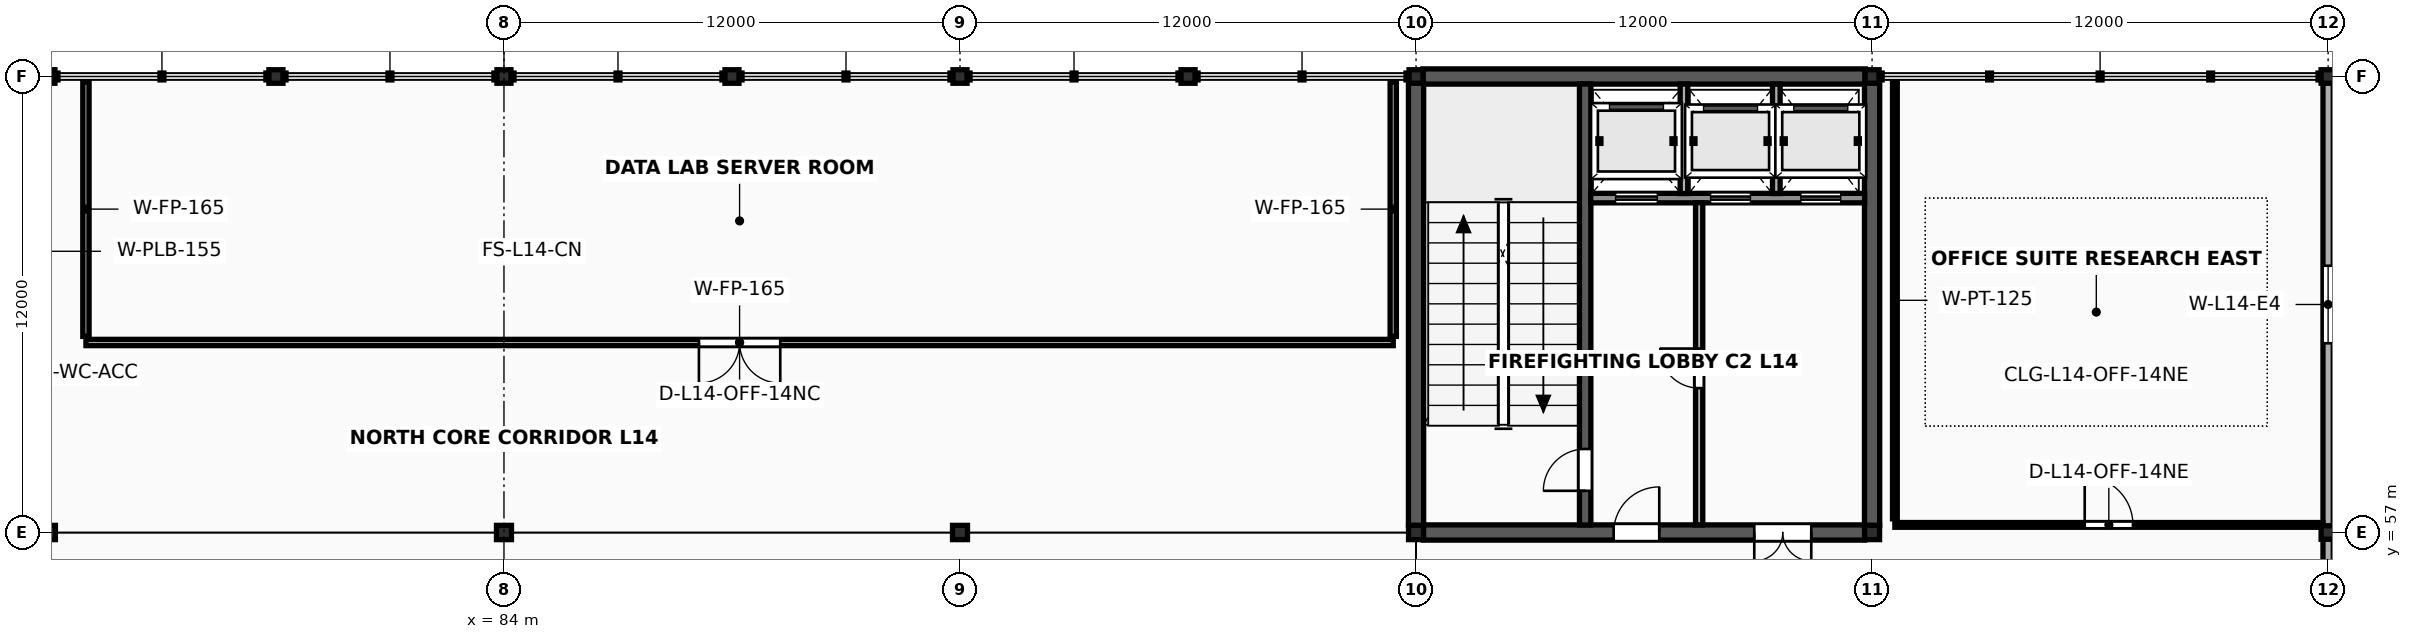
"""IFC4 building model, lengths in metres.
Left out: names, types, materials, properties, quantities, classifications, styles, units other than length and angle.
Written with IfcOpenShell. Run it as: python <this file> out.ifc"""

import sys

from ifc_helpers import new_model, si_unit, direction, frame, frame_2d, origin, origin_2d, place, context, subcontext, project, spatial, rectangle, i_section, extrude, element, fill, save


model = new_model("IFC4")
c1 = context("Model", 3, precision=1e-05, world=origin(), true_north=direction((0.0, 1.0)))
c2 = subcontext(c1, "Body", "Model", "MODEL_VIEW")
j1 = project(units=[si_unit("LENGTHUNIT", "METRE"), si_unit("PLANEANGLEUNIT", "RADIAN")], contexts=[c1])
p1 = place(None, origin())
s1 = spatial("IfcSite", under=j1, at=p1, CompositionType="ELEMENT")
p2 = place(p1, origin())
s2 = spatial("IfcBuilding", under=s1, at=p2, CompositionType="ELEMENT")
p3 = place(p2, frame((0.0, 0.0, 57.6)))
s3 = spatial("IfcBuildingStorey", under=s2, at=p3, CompositionType="ELEMENT", Elevation=57.6)
p4 = place(p3, frame((72.0, 57.0, 0.0), z_axis=(0.0, 0.0, 1.0), x_axis=(1.0, 0.0, 0.0)))
e1 = element("IfcColumn", 1, at=p4, inside=s3, PredefinedType="COLUMN", context=c2, shape_type="SweptSolid", body=[
    extrude(i_section(OverallWidth=0.394, OverallDepth=0.375, WebThickness=0.017, FlangeThickness=0.028, FilletRadius=0.018, at=origin_2d()), origin(), (0.0, 0.0, 1.0), 4.0),
])
p5 = place(p3, frame((72.0, 69.0, 0.0), z_axis=(0.0, 0.0, 1.0), x_axis=(1.0, 0.0, 0.0)))
e2 = element("IfcColumn", 2, at=p5, inside=s3, PredefinedType="COLUMN", context=c2, shape_type="SweptSolid", body=[
    extrude(i_section(OverallWidth=0.369, OverallDepth=0.356, WebThickness=0.011, FlangeThickness=0.018, FilletRadius=0.018, at=origin_2d()), origin(), (0.0, 0.0, 1.0), 4.0),
])
p6 = place(p3, frame((84.0, 57.0, 0.0), z_axis=(0.0, 0.0, 1.0), x_axis=(1.0, 0.0, 0.0)))
e3 = element("IfcColumn", 3, at=p6, inside=s3, PredefinedType="COLUMN", context=c2, shape_type="SweptSolid", body=[
    extrude(i_section(OverallWidth=0.394, OverallDepth=0.375, WebThickness=0.017, FlangeThickness=0.028, FilletRadius=0.018, at=origin_2d()), origin(), (0.0, 0.0, 1.0), 4.0),
])
p7 = place(p3, frame((84.0, 69.0, 0.0), z_axis=(0.0, 0.0, 1.0), x_axis=(1.0, 0.0, 0.0)))
e4 = element("IfcColumn", 4, at=p7, inside=s3, PredefinedType="COLUMN", context=c2, shape_type="SweptSolid", body=[
    extrude(i_section(OverallWidth=0.369, OverallDepth=0.356, WebThickness=0.011, FlangeThickness=0.018, FilletRadius=0.018, at=origin_2d()), origin(), (0.0, 0.0, 1.0), 4.0),
])
p8 = place(p3, frame((96.0, 57.0, 0.0), z_axis=(0.0, 0.0, 1.0), x_axis=(1.0, 0.0, 0.0)))
e5 = element("IfcColumn", 5, at=p8, inside=s3, PredefinedType="COLUMN", context=c2, shape_type="SweptSolid", body=[
    extrude(i_section(OverallWidth=0.394, OverallDepth=0.375, WebThickness=0.017, FlangeThickness=0.028, FilletRadius=0.018, at=origin_2d()), origin(), (0.0, 0.0, 1.0), 4.0),
])
p9 = place(p3, frame((96.0, 69.0, 0.0), z_axis=(0.0, 0.0, 1.0), x_axis=(1.0, 0.0, 0.0)))
e6 = element("IfcColumn", 6, at=p9, inside=s3, PredefinedType="COLUMN", context=c2, shape_type="SweptSolid", body=[
    extrude(i_section(OverallWidth=0.369, OverallDepth=0.356, WebThickness=0.011, FlangeThickness=0.018, FilletRadius=0.018, at=origin_2d()), origin(), (0.0, 0.0, 1.0), 4.0),
])
p10 = place(p3, frame((108.0, 57.0, 0.0), z_axis=(0.0, 0.0, 1.0), x_axis=(1.0, 0.0, 0.0)))
e7 = element("IfcColumn", 7, at=p10, inside=s3, PredefinedType="COLUMN", context=c2, shape_type="SweptSolid", body=[
    extrude(i_section(OverallWidth=0.394, OverallDepth=0.375, WebThickness=0.017, FlangeThickness=0.028, FilletRadius=0.018, at=origin_2d()), origin(), (0.0, 0.0, 1.0), 4.0),
])
p11 = place(p3, frame((108.0, 69.0, 0.0), z_axis=(0.0, 0.0, 1.0), x_axis=(1.0, 0.0, 0.0)))
e8 = element("IfcColumn", 8, at=p11, inside=s3, PredefinedType="COLUMN", context=c2, shape_type="SweptSolid", body=[
    extrude(i_section(OverallWidth=0.369, OverallDepth=0.356, WebThickness=0.011, FlangeThickness=0.018, FilletRadius=0.018, at=origin_2d()), origin(), (0.0, 0.0, 1.0), 4.0),
])
p12 = place(p3, frame((120.0, 57.0, 0.0), z_axis=(0.0, 0.0, 1.0), x_axis=(1.0, 0.0, 0.0)))
e9 = element("IfcColumn", 9, at=p12, inside=s3, PredefinedType="COLUMN", context=c2, shape_type="SweptSolid", body=[
    extrude(i_section(OverallWidth=0.394, OverallDepth=0.375, WebThickness=0.017, FlangeThickness=0.028, FilletRadius=0.018, at=origin_2d()), origin(), (0.0, 0.0, 1.0), 4.0),
])
for number, where, z_axis, x_axis in (
    (10, (120.0, 69.0, 0.0), (0.0, 0.0, 1.0), (1.0, 0.0, 0.0)),
    (11, (132.0, 57.0, 0.0), (0.0, 0.0, 1.0), (1.0, 0.0, 0.0)),
    (12, (132.0, 69.0, 0.0), (0.0, 0.0, 1.0), (1.0, 0.0, 0.0)),
    (13, (78.0, 69.0, 0.0), (0.0, 0.0, 1.0), (1.0, 0.0, 0.0)),
    (14, (90.0, 69.0, 0.0), (0.0, 0.0, 1.0), (1.0, 0.0, 0.0)),
    (15, (102.0, 69.0, 0.0), (0.0, 0.0, 1.0), (1.0, 0.0, 0.0)),
):
    element("IfcColumn", number, at=place(p3, frame(where, z_axis=z_axis, x_axis=x_axis)), inside=s3, PredefinedType="COLUMN", context=c2, shape_type="SweptSolid", body=[
        extrude(i_section(OverallWidth=0.369, OverallDepth=0.356, WebThickness=0.011, FlangeThickness=0.018, FilletRadius=0.018, at=origin_2d()), origin(), (0.0, 0.0, 1.0), 4.0),
    ])
p13 = place(p3, frame((108.194, 57.0, 0.0), z_axis=(0.0, 0.0, 1.0), x_axis=(1.0, 0.0, 0.0)))
e16 = element("IfcWall", 16, at=p13, inside=s3, PredefinedType="SHEAR", context=c2, shape_type="SweptSolid", body=[
    extrude(rectangle(XDim=11.612, YDim=0.4, at=frame_2d((5.806, 0.0))), origin(), (0.0, 0.0, 1.0), 3.853),
])
p14 = place(p13, frame((5.006, 0.0, 0.0)))
e17 = element("IfcOpeningElement", 17, at=p14, cuts=e16, PredefinedType="OPENING", context=c2, shape_type="SweptSolid", body=[
    extrude(rectangle(XDim=1.2, YDim=2.2, at=frame_2d((0.6, 1.1))), frame((0.0, 0.215, 0.0), z_axis=(0.0, -1.0, 0.0), x_axis=(1.0, 0.0, 0.0)), (0.0, 0.0, 1.0), 0.43),
])
p15 = place(p13, frame((8.706, 0.0, 0.0)))
e18 = element("IfcOpeningElement", 18, at=p15, cuts=e16, PredefinedType="OPENING", context=c2, shape_type="SweptSolid", body=[
    extrude(rectangle(XDim=1.5, YDim=2.25, at=frame_2d((0.75, 1.125))), frame((0.0, 0.215, 0.0), z_axis=(0.0, -1.0, 0.0), x_axis=(1.0, 0.0, 0.0)), (0.0, 0.0, 1.0), 0.43),
])
p16 = place(p3, frame((108.181, 69.0, 0.0), z_axis=(0.0, 0.0, 1.0), x_axis=(1.0, 0.0, 0.0)))
e19 = element("IfcWall", 19, at=p16, inside=s3, PredefinedType="SHEAR", context=c2, shape_type="SweptSolid", body=[
    extrude(rectangle(XDim=11.637, YDim=0.4, at=frame_2d((5.819, 0.0))), origin(), (0.0, 0.0, 1.0), 3.853),
])
for number, where, z_axis, x_axis in (
    (20, (108.0, 57.185, 0.0), (0.0, 0.0, 1.0), (0.0, 1.0, 0.0)),
    (21, (120.0, 57.185, 0.0), (0.0, 0.0, 1.0), (0.0, 1.0, 0.0)),
):
    element("IfcWall", number, at=place(p3, frame(where, z_axis=z_axis, x_axis=x_axis)), inside=s3, PredefinedType="SHEAR", context=c2, shape_type="SweptSolid", body=[
        extrude(rectangle(XDim=11.64, YDim=0.4, at=frame_2d((5.82, 0.0))), origin(), (0.0, 0.0, 1.0), 3.853),
    ])
p17 = place(p3, frame((112.45, 57.197, 0.0), z_axis=(0.0, 0.0, 1.0), x_axis=(0.0, 1.0, 0.0)))
e22 = element("IfcWall", 22, at=p17, inside=s3, PredefinedType="SHEAR", context=c2, shape_type="SweptSolid", body=[
    extrude(rectangle(XDim=11.606, YDim=0.3, at=frame_2d((5.803, 0.0))), origin(), (0.0, 0.0, 1.0), 3.853),
])
p18 = place(p17, frame((0.9, 0.0, 0.0)))
e23 = element("IfcOpeningElement", 23, at=p18, cuts=e22, PredefinedType="OPENING", context=c2, shape_type="SweptSolid", body=[
    extrude(rectangle(XDim=1.1, YDim=2.2, at=frame_2d((0.55, 1.1))), frame((0.0, 0.165, 0.0), z_axis=(0.0, -1.0, 0.0), x_axis=(1.0, 0.0, 0.0)), (0.0, 0.0, 1.0), 0.33),
])
p19 = place(p3, frame((112.597, 65.8, 0.0), z_axis=(0.0, 0.0, 1.0), x_axis=(1.0, 0.0, 0.0)))
e24 = element("IfcWall", 24, at=p19, inside=s3, PredefinedType="SOLIDWALL", context=c2, shape_type="SweptSolid", body=[
    extrude(rectangle(XDim=7.206, YDim=0.25, at=frame_2d((3.603, 0.0))), origin(), (0.0, 0.0, 1.0), 3.853),
])
p20 = place(p19, frame((0.653, 0.0, 0.0)))
e25 = element("IfcOpeningElement", 25, at=p20, cuts=e24, PredefinedType="OPENING", context=c2, shape_type="SweptSolid", body=[
    extrude(rectangle(XDim=1.1, YDim=2.24, at=frame_2d((0.55, 1.12))), frame((0.0, 0.14, 0.0), z_axis=(0.0, -1.0, 0.0), x_axis=(1.0, 0.0, 0.0)), (0.0, 0.0, 1.0), 0.28),
])
p21 = place(p19, frame((3.153, 0.0, 0.0)))
e26 = element("IfcOpeningElement", 26, at=p21, cuts=e24, PredefinedType="OPENING", context=c2, shape_type="SweptSolid", body=[
    extrude(rectangle(XDim=1.05, YDim=2.2, at=frame_2d((0.525, 1.1))), frame((0.0, 0.14, 0.0), z_axis=(0.0, -1.0, 0.0), x_axis=(1.0, 0.0, 0.0)), (0.0, 0.0, 1.0), 0.28),
])
p22 = place(p19, frame((5.528, 0.0, 0.0)))
e27 = element("IfcOpeningElement", 27, at=p22, cuts=e24, PredefinedType="OPENING", context=c2, shape_type="SweptSolid", body=[
    extrude(rectangle(XDim=1.05, YDim=2.2, at=frame_2d((0.525, 1.1))), frame((0.0, 0.14, 0.0), z_axis=(0.0, -1.0, 0.0), x_axis=(1.0, 0.0, 0.0)), (0.0, 0.0, 1.0), 0.28),
])
for number, where, z_axis, x_axis in (
    (28, (115.05, 65.92, 0.0), (0.0, 0.0, 1.0), (0.0, 1.0, 0.0)),
    (29, (117.48, 65.92, 0.0), (0.0, 0.0, 1.0), (0.0, 1.0, 0.0)),
):
    element("IfcWall", number, at=place(p3, frame(where, z_axis=z_axis, x_axis=x_axis)), inside=s3, PredefinedType="SOLIDWALL", context=c2, shape_type="SweptSolid", body=[
        extrude(rectangle(XDim=2.88, YDim=0.2, at=frame_2d((1.44, 0.0))), origin(), (0.0, 0.0, 1.0), 3.843),
    ])
p23 = place(p3, frame((115.45, 57.2, 0.0), z_axis=(0.0, 0.0, 1.0), x_axis=(0.0, 1.0, 0.0)))
e30 = element("IfcWall", 30, at=p23, inside=s3, PredefinedType="SOLIDWALL", context=c2, shape_type="SweptSolid", body=[
    extrude(rectangle(XDim=8.48, YDim=0.19, at=frame_2d((4.24, 0.0))), origin(), (0.0, 0.0, 1.0), 3.843),
])
p24 = place(p23, frame((3.6, 0.0, 0.0)))
e31 = element("IfcOpeningElement", 31, at=p24, cuts=e30, PredefinedType="OPENING", context=c2, shape_type="SweptSolid", body=[
    extrude(rectangle(XDim=1.04, YDim=2.18, at=frame_2d((0.52, 1.09))), frame((0.0, 0.11, 0.0), z_axis=(0.0, -1.0, 0.0), x_axis=(1.0, 0.0, 0.0)), (0.0, 0.0, 1.0), 0.22),
])
p25 = place(p3, frame((132.0, 45.176, 0.0), z_axis=(0.0, 0.0, 1.0), x_axis=(0.0, 1.0, 0.0)))
e32 = element("IfcWall", 32, at=p25, inside=s3, PredefinedType="SOLIDWALL", context=c2, shape_type="SweptSolid", body=[
    extrude(rectangle(XDim=11.648, YDim=0.27, at=frame_2d((5.824, 0.0))), origin(), (0.0, 0.0, 1.0), 3.216),
])
p26 = place(p25, frame((4.894, 0.0, 0.78)))
e33 = element("IfcOpeningElement", 33, at=p26, cuts=e32, PredefinedType="OPENING", context=c2, shape_type="SweptSolid", body=[
    extrude(rectangle(XDim=1.86, YDim=1.74, at=frame_2d((0.93, 0.87))), frame((0.0, 0.15, 0.0), z_axis=(0.0, -1.0, 0.0), x_axis=(1.0, 0.0, 0.0)), (0.0, 0.0, 1.0), 0.3),
])
p27 = place(p3, frame((132.0, 57.176, 0.0), z_axis=(0.0, 0.0, 1.0), x_axis=(0.0, 1.0, 0.0)))
e34 = element("IfcWall", 34, at=p27, inside=s3, PredefinedType="SOLIDWALL", context=c2, shape_type="SweptSolid", body=[
    extrude(rectangle(XDim=11.648, YDim=0.27, at=frame_2d((5.824, 0.0))), origin(), (0.0, 0.0, 1.0), 3.216),
])
p28 = place(p27, frame((4.804, 0.0, 0.78)))
e35 = element("IfcOpeningElement", 35, at=p28, cuts=e34, PredefinedType="OPENING", context=c2, shape_type="SweptSolid", body=[
    extrude(rectangle(XDim=2.04, YDim=1.74, at=frame_2d((1.02, 0.87))), frame((0.0, 0.15, 0.0), z_axis=(0.0, -1.0, 0.0), x_axis=(1.0, 0.0, 0.0)), (0.0, 0.0, 1.0), 0.3),
])
p29 = place(p3, frame((73.0, 62.0, 0.0), z_axis=(0.0, 0.0, 1.0), x_axis=(1.0, 0.0, 0.0)))
e36 = element("IfcWall", 36, at=p29, inside=s3, PredefinedType="PARTITIONING", context=c2, shape_type="SweptSolid", body=[
    extrude(rectangle(XDim=34.4, YDim=0.165, at=frame_2d((17.2, 0.0))), origin(), (0.0, 0.0, 1.0), 2.88),
])
p30 = place(p29, frame((16.13, 0.0, 0.0)))
e37 = element("IfcOpeningElement", 37, at=p30, cuts=e36, PredefinedType="OPENING", context=c2, shape_type="SweptSolid", body=[
    extrude(rectangle(XDim=2.14, YDim=2.44, at=frame_2d((1.07, 1.22))), frame((0.0, 0.097, 0.0), z_axis=(0.0, -1.0, 0.0), x_axis=(1.0, 0.0, 0.0)), (0.0, 0.0, 1.0), 0.195),
])
for number, where, z_axis, x_axis in (
    (38, (73.0, 62.16, 0.0), (0.0, 0.0, 1.0), (0.0, 1.0, 0.0)),
    (39, (107.4, 62.16, 0.0), (0.0, 0.0, 1.0), (0.0, 1.0, 0.0)),
):
    element("IfcWall", number, at=place(p3, frame(where, z_axis=z_axis, x_axis=x_axis)), inside=s3, PredefinedType="PARTITIONING", context=c2, shape_type="SweptSolid", body=[
        extrude(rectangle(XDim=6.7, YDim=0.165, at=frame_2d((3.35, 0.0))), origin(), (0.0, 0.0, 1.0), 2.88),
    ])
p31 = place(p3, frame((120.6, 57.2, 0.0), z_axis=(0.0, 0.0, 1.0), x_axis=(1.0, 0.0, 0.0)))
e40 = element("IfcWall", 40, at=p31, inside=s3, PredefinedType="PARTITIONING", context=c2, shape_type="SweptSolid", body=[
    extrude(rectangle(XDim=11.26, YDim=0.125, at=frame_2d((5.63, 0.0))), origin(), (0.0, 0.0, 1.0), 2.88),
])
p32 = place(p31, frame((4.995, 0.0, 0.0)))
e41 = element("IfcOpeningElement", 41, at=p32, cuts=e40, PredefinedType="OPENING", context=c2, shape_type="SweptSolid", body=[
    extrude(rectangle(XDim=1.27, YDim=2.27, at=frame_2d((0.635, 1.135))), frame((0.0, 0.077, 0.0), z_axis=(0.0, -1.0, 0.0), x_axis=(1.0, 0.0, 0.0)), (0.0, 0.0, 1.0), 0.155),
])
p33 = place(p3, frame((120.6, 57.36, 0.0), z_axis=(0.0, 0.0, 1.0), x_axis=(0.0, 1.0, 0.0)))
e42 = element("IfcWall", 42, at=p33, inside=s3, PredefinedType="PARTITIONING", context=c2, shape_type="SweptSolid", body=[
    extrude(rectangle(XDim=11.5, YDim=0.125, at=frame_2d((5.75, 0.0))), origin(), (0.0, 0.0, 1.0), 2.88),
])
p34 = place(p28, origin())
e43 = element("IfcWindow", 43, at=p34, inside=s3, PartitioningType="DOUBLE_PANEL_VERTICAL", PredefinedType="WINDOW", context=c2, shape_type="SweptSolid", body=[
    extrude(rectangle(XDim=2.04, YDim=1.74, at=frame_2d((1.02, 0.87))), frame((0.0, 0.03, 0.0), z_axis=(0.0, -1.0, 0.0), x_axis=(1.0, 0.0, 0.0)), (0.0, 0.0, 1.0), 0.06),
])
fill(e35, e43)
p35 = place(p18, origin())
e44 = element("IfcDoor", 44, at=p35, inside=s3, OperationType="SINGLE_SWING_LEFT", PredefinedType="DOOR", context=c2, shape_type="SweptSolid", body=[
    extrude(rectangle(XDim=1.1, YDim=2.2, at=frame_2d((0.55, 1.1))), frame((0.0, 0.025, 0.0), z_axis=(0.0, -1.0, 0.0), x_axis=(1.0, 0.0, 0.0)), (0.0, 0.0, 1.0), 0.05),
])
fill(e23, e44)
p36 = place(p24, origin())
e45 = element("IfcDoor", 45, at=p36, inside=s3, OperationType="SINGLE_SWING_RIGHT", PredefinedType="DOOR", context=c2, shape_type="SweptSolid", body=[
    extrude(rectangle(XDim=1.04, YDim=2.18, at=frame_2d((0.52, 1.09))), frame((0.0, 0.025, 0.0), z_axis=(0.0, -1.0, 0.0), x_axis=(1.0, 0.0, 0.0)), (0.0, 0.0, 1.0), 0.05),
])
fill(e31, e45)
p37 = place(p14, origin())
e46 = element("IfcDoor", 46, at=p37, inside=s3, OperationType="SINGLE_SWING_RIGHT", PredefinedType="DOOR", context=c2, shape_type="SweptSolid", body=[
    extrude(rectangle(XDim=1.2, YDim=2.2, at=frame_2d((0.6, 1.1))), frame((0.0, 0.025, 0.0), z_axis=(0.0, -1.0, 0.0), x_axis=(1.0, 0.0, 0.0)), (0.0, 0.0, 1.0), 0.05),
])
fill(e17, e46)
p38 = place(p15, origin())
e47 = element("IfcDoor", 47, at=p38, inside=s3, OperationType="DOUBLE_DOOR_SINGLE_SWING", PredefinedType="DOOR", context=c2, shape_type="SweptSolid", body=[
    extrude(rectangle(XDim=1.5, YDim=2.25, at=frame_2d((0.75, 1.125))), frame((0.0, 0.025, 0.0), z_axis=(0.0, -1.0, 0.0), x_axis=(1.0, 0.0, 0.0)), (0.0, 0.0, 1.0), 0.05),
])
fill(e18, e47)
p39 = place(p20, origin())
e48 = element("IfcDoor", 48, at=p39, inside=s3, OperationType="SLIDING_TO_LEFT", PredefinedType="USERDEFINED", context=c2, shape_type="SweptSolid", body=[
    extrude(rectangle(XDim=1.1, YDim=2.24, at=frame_2d((0.55, 1.12))), frame((0.0, 0.025, 0.0), z_axis=(0.0, -1.0, 0.0), x_axis=(1.0, 0.0, 0.0)), (0.0, 0.0, 1.0), 0.05),
])
fill(e25, e48)
p40 = place(p21, origin())
e49 = element("IfcDoor", 49, at=p40, inside=s3, OperationType="SLIDING_TO_LEFT", PredefinedType="USERDEFINED", context=c2, shape_type="SweptSolid", body=[
    extrude(rectangle(XDim=1.05, YDim=2.2, at=frame_2d((0.525, 1.1))), frame((0.0, 0.025, 0.0), z_axis=(0.0, -1.0, 0.0), x_axis=(1.0, 0.0, 0.0)), (0.0, 0.0, 1.0), 0.05),
])
fill(e26, e49)
p41 = place(p22, origin())
e50 = element("IfcDoor", 50, at=p41, inside=s3, OperationType="SLIDING_TO_LEFT", PredefinedType="USERDEFINED", context=c2, shape_type="SweptSolid", body=[
    extrude(rectangle(XDim=1.05, YDim=2.2, at=frame_2d((0.525, 1.1))), frame((0.0, 0.025, 0.0), z_axis=(0.0, -1.0, 0.0), x_axis=(1.0, 0.0, 0.0)), (0.0, 0.0, 1.0), 0.05),
])
fill(e27, e50)
p42 = place(p30, origin())
e51 = element("IfcDoor", 51, at=p42, inside=s3, OperationType="DOUBLE_DOOR_SINGLE_SWING", PredefinedType="DOOR", context=c2, shape_type="SweptSolid", body=[
    extrude(rectangle(XDim=2.14, YDim=2.44, at=frame_2d((1.07, 1.22))), frame((0.0, 0.025, 0.0), z_axis=(0.0, -1.0, 0.0), x_axis=(1.0, 0.0, 0.0)), (0.0, 0.0, 1.0), 0.05),
])
fill(e37, e51)
p43 = place(p32, origin())
e52 = element("IfcDoor", 52, at=p43, inside=s3, OperationType="SINGLE_SWING_LEFT", PredefinedType="DOOR", context=c2, shape_type="SweptSolid", body=[
    extrude(rectangle(XDim=1.27, YDim=2.27, at=frame_2d((0.635, 1.135))), frame((0.0, 0.025, 0.0), z_axis=(0.0, -1.0, 0.0), x_axis=(1.0, 0.0, 0.0)), (0.0, 0.0, 1.0), 0.05),
])
fill(e41, e52)
save(model, sys.argv[1])
